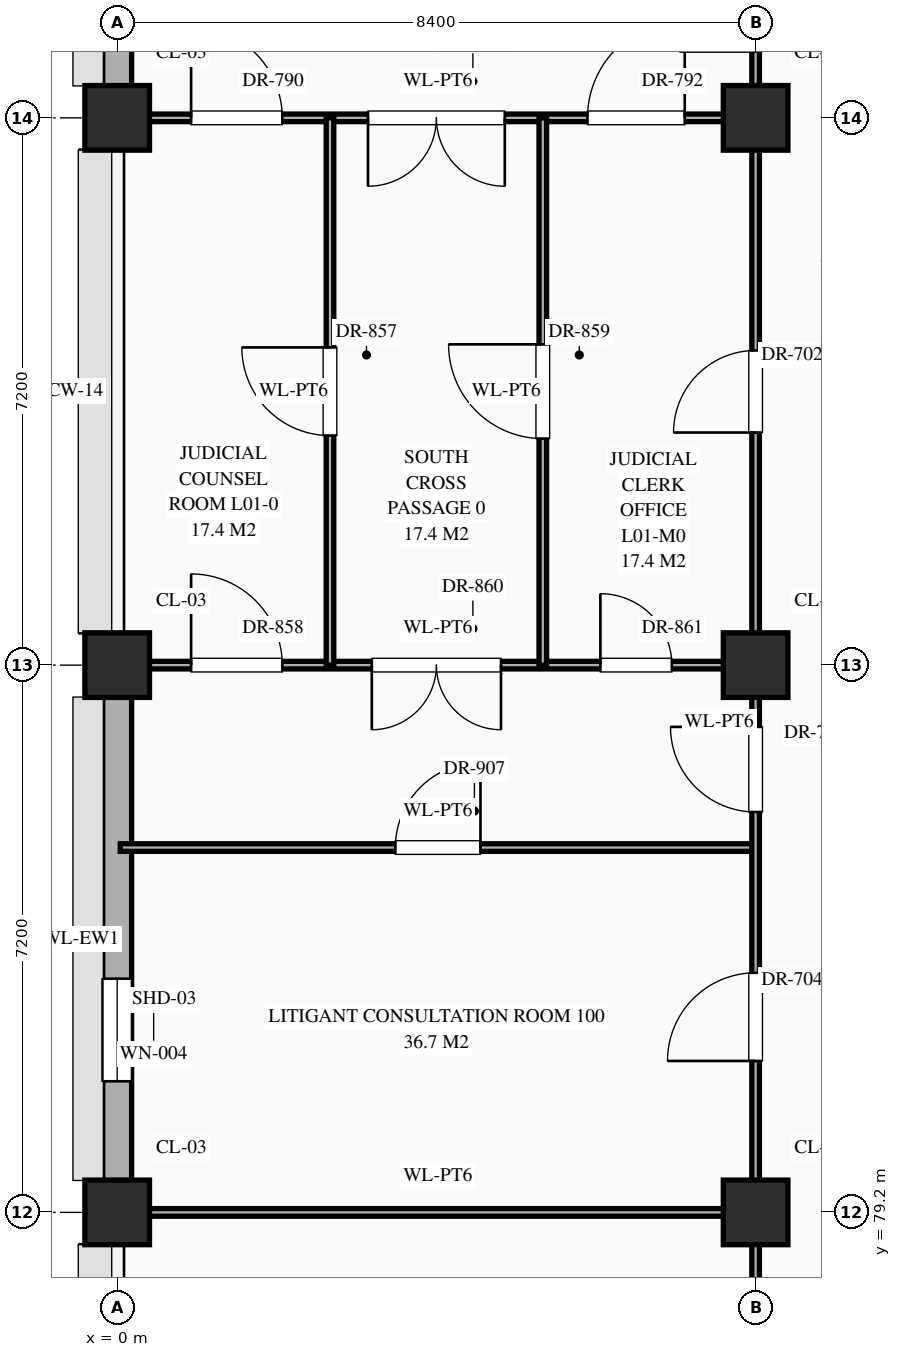
"""IFC4 building model, lengths in metres.
Left out: names, types, materials, properties, quantities, classifications, styles, units other than length and angle.
Written with IfcOpenShell. Run it as: python <this file> out.ifc"""

import sys

from ifc_helpers import new_model, si_unit, direction, frame, frame_2d, origin, origin_2d, place, context, subcontext, project, spatial, rectangle, extrude, element, fill, save


model = new_model("IFC4")
c1 = context("Model", 3, precision=1e-05, world=origin(), true_north=direction((0.0, 1.0)))
c2 = subcontext(c1, "Body", "Model", "MODEL_VIEW")
j1 = project(units=[si_unit("LENGTHUNIT", "METRE"), si_unit("PLANEANGLEUNIT", "RADIAN")], contexts=[c1])
p1 = place(None, origin())
s1 = spatial("IfcSite", under=j1, at=p1, CompositionType="ELEMENT")
p2 = place(p1, origin())
s2 = spatial("IfcBuilding", under=s1, at=p2, CompositionType="ELEMENT")
p3 = place(p2, origin())
s3 = spatial("IfcBuildingStorey", under=s2, at=p3, CompositionType="ELEMENT", Elevation=0.0)
for number, where, z_axis, x_axis in (
    (1, (0.0, 79.2, 0.0), (0.0, 0.0, 1.0), (1.0, 0.0, 0.0)),
    (2, (0.0, 86.4, 0.0), (0.0, 0.0, 1.0), (1.0, 0.0, 0.0)),
    (3, (0.0, 93.6, 0.0), (0.0, 0.0, 1.0), (1.0, 0.0, 0.0)),
    (4, (8.4, 79.2, 0.0), (0.0, 0.0, 1.0), (1.0, 0.0, 0.0)),
    (5, (8.4, 86.4, 0.0), (0.0, 0.0, 1.0), (1.0, 0.0, 0.0)),
    (6, (8.4, 93.6, 0.0), (0.0, 0.0, 1.0), (1.0, 0.0, 0.0)),
):
    element("IfcColumn", number, at=place(p3, frame(where, z_axis=z_axis, x_axis=x_axis)), inside=s3, PredefinedType="COLUMN", context=c2, shape_type="SweptSolid", body=[
        extrude(rectangle(XDim=0.85, YDim=0.85, at=origin_2d()), origin(), (0.0, 0.0, 1.0), 5.4),
    ])
p4 = place(p3, frame((0.0, 79.62, 0.0), z_axis=(0.0, 0.0, 1.0), x_axis=(0.0, 1.0, 0.0)))
e7 = element("IfcWall", 7, at=p4, inside=s3, PredefinedType="STANDARD", context=c2, shape_type="SweptSolid", body=[
    extrude(rectangle(XDim=6.36, YDim=0.38, at=frame_2d((3.18, 0.0))), origin(), (0.0, 0.0, 1.0), 4.47),
])
p5 = place(p4, frame((1.305, 0.0, 0.85)))
e8 = element("IfcOpeningElement", 8, at=p5, cuts=e7, PredefinedType="OPENING", context=c2, shape_type="SweptSolid", body=[
    extrude(rectangle(XDim=1.35, YDim=1.56, at=frame_2d((0.675, 0.78))), frame((0.0, 0.202, 0.0), z_axis=(0.0, -1.0, 0.0), x_axis=(1.0, 0.0, 0.0)), (0.0, 0.0, 1.0), 0.404),
])
p6 = place(p3, frame((0.0, 94.02, 0.0), z_axis=(0.0, 0.0, 1.0), x_axis=(0.0, 1.0, 0.0)))
e9 = element("IfcWall", 9, at=p6, inside=s3, PredefinedType="STANDARD", context=c2, shape_type="SweptSolid", body=[
    extrude(rectangle(XDim=6.36, YDim=0.38, at=frame_2d((3.18, 0.0))), origin(), (0.0, 0.0, 1.0), 4.47),
])
p7 = place(p6, frame((3.805, 0.0, 0.85)))
e10 = element("IfcOpeningElement", 10, at=p7, cuts=e9, PredefinedType="OPENING", context=c2, shape_type="SweptSolid", body=[
    extrude(rectangle(XDim=1.35, YDim=1.92, at=frame_2d((0.675, 0.96))), frame((0.0, 0.202, 0.0), z_axis=(0.0, -1.0, 0.0), x_axis=(1.0, 0.0, 0.0)), (0.0, 0.0, 1.0), 0.404),
])
p8 = place(p3, frame((0.04, 79.2, 0.0), z_axis=(0.0, 0.0, 1.0), x_axis=(1.0, 0.0, 0.0)))
e11 = element("IfcWall", 11, at=p8, inside=s3, PredefinedType="STANDARD", context=c2, shape_type="SweptSolid", body=[
    extrude(rectangle(XDim=8.36, YDim=0.1, at=frame_2d((4.18, 0.0))), origin(), (0.0, 0.0, 1.0), 4.27),
])
p9 = place(p3, frame((0.04, 84.0, 0.0), z_axis=(0.0, 0.0, 1.0), x_axis=(1.0, 0.0, 0.0)))
e12 = element("IfcWall", 12, at=p9, inside=s3, PredefinedType="STANDARD", context=c2, shape_type="SweptSolid", body=[
    extrude(rectangle(XDim=8.36, YDim=0.1, at=frame_2d((4.18, 0.0))), origin(), (0.0, 0.0, 1.0), 5.12),
])
p10 = place(p9, frame((3.62, 0.0, 0.0)))
e13 = element("IfcOpeningElement", 13, at=p10, cuts=e12, PredefinedType="OPENING", context=c2, shape_type="SweptSolid", body=[
    extrude(rectangle(XDim=1.12, YDim=2.25, at=frame_2d((0.56, 1.125))), frame((0.0, 0.062, 0.0), z_axis=(0.0, -1.0, 0.0), x_axis=(1.0, 0.0, 0.0)), (0.0, 0.0, 1.0), 0.124),
])
p11 = place(p3, frame((0.04, 86.4, 0.0), z_axis=(0.0, 0.0, 1.0), x_axis=(1.0, 0.0, 0.0)))
e14 = element("IfcWall", 14, at=p11, inside=s3, PredefinedType="STANDARD", context=c2, shape_type="SweptSolid", body=[
    extrude(rectangle(XDim=8.36, YDim=0.1, at=frame_2d((4.18, 0.0))), origin(), (0.0, 0.0, 1.0), 4.27),
])
p12 = place(p11, frame((0.933, 0.0, 0.0)))
e15 = element("IfcOpeningElement", 15, at=p12, cuts=e14, PredefinedType="OPENING", context=c2, shape_type="SweptSolid", body=[
    extrude(rectangle(XDim=1.2, YDim=2.35, at=frame_2d((0.6, 1.175))), frame((0.0, 0.062, 0.0), z_axis=(0.0, -1.0, 0.0), x_axis=(1.0, 0.0, 0.0)), (0.0, 0.0, 1.0), 0.124),
])
p13 = place(p11, frame((3.31, 0.0, 0.0)))
e16 = element("IfcOpeningElement", 16, at=p13, cuts=e14, PredefinedType="OPENING", context=c2, shape_type="SweptSolid", body=[
    extrude(rectangle(XDim=1.7, YDim=2.45, at=frame_2d((0.85, 1.225))), frame((0.0, 0.062, 0.0), z_axis=(0.0, -1.0, 0.0), x_axis=(1.0, 0.0, 0.0)), (0.0, 0.0, 1.0), 0.124),
])
p14 = place(p11, frame((6.317, 0.0, 0.0)))
e17 = element("IfcOpeningElement", 17, at=p14, cuts=e14, PredefinedType="OPENING", context=c2, shape_type="SweptSolid", body=[
    extrude(rectangle(XDim=0.94, YDim=2.3, at=frame_2d((0.47, 1.15))), frame((0.0, 0.062, 0.0), z_axis=(0.0, -1.0, 0.0), x_axis=(1.0, 0.0, 0.0)), (0.0, 0.0, 1.0), 0.124),
])
p15 = place(p3, frame((0.04, 93.6, 0.0), z_axis=(0.0, 0.0, 1.0), x_axis=(1.0, 0.0, 0.0)))
e18 = element("IfcWall", 18, at=p15, inside=s3, PredefinedType="STANDARD", context=c2, shape_type="SweptSolid", body=[
    extrude(rectangle(XDim=8.36, YDim=0.1, at=frame_2d((4.18, 0.0))), origin(), (0.0, 0.0, 1.0), 4.27),
])
p16 = place(p15, frame((0.933, 0.0, 0.0)))
e19 = element("IfcOpeningElement", 19, at=p16, cuts=e18, PredefinedType="OPENING", context=c2, shape_type="SweptSolid", body=[
    extrude(rectangle(XDim=1.2, YDim=2.35, at=frame_2d((0.6, 1.175))), frame((0.0, 0.062, 0.0), z_axis=(0.0, -1.0, 0.0), x_axis=(1.0, 0.0, 0.0)), (0.0, 0.0, 1.0), 0.124),
])
p17 = place(p15, frame((3.26, 0.0, 0.0)))
e20 = element("IfcOpeningElement", 20, at=p17, cuts=e18, PredefinedType="OPENING", context=c2, shape_type="SweptSolid", body=[
    extrude(rectangle(XDim=1.8, YDim=2.5, at=frame_2d((0.9, 1.25))), frame((0.0, 0.062, 0.0), z_axis=(0.0, -1.0, 0.0), x_axis=(1.0, 0.0, 0.0)), (0.0, 0.0, 1.0), 0.124),
])
p18 = place(p15, frame((6.147, 0.0, 0.0)))
e21 = element("IfcOpeningElement", 21, at=p18, cuts=e18, PredefinedType="OPENING", context=c2, shape_type="SweptSolid", body=[
    extrude(rectangle(XDim=1.28, YDim=2.35, at=frame_2d((0.64, 1.175))), frame((0.0, 0.062, 0.0), z_axis=(0.0, -1.0, 0.0), x_axis=(1.0, 0.0, 0.0)), (0.0, 0.0, 1.0), 0.124),
])
p19 = place(p3, frame((2.8, 86.4, 0.0), z_axis=(0.0, 0.0, 1.0), x_axis=(0.0, 1.0, 0.0)))
e22 = element("IfcWall", 22, at=p19, inside=s3, PredefinedType="STANDARD", context=c2, shape_type="SweptSolid", body=[
    extrude(rectangle(XDim=7.2, YDim=0.1, at=frame_2d((3.6, 0.0))), origin(), (0.0, 0.0, 1.0), 5.12),
])
p20 = place(p19, frame((3.02, 0.0, 0.0)))
e23 = element("IfcOpeningElement", 23, at=p20, cuts=e22, PredefinedType="OPENING", context=c2, shape_type="SweptSolid", body=[
    extrude(rectangle(XDim=1.16, YDim=2.3, at=frame_2d((0.58, 1.15))), frame((0.0, 0.062, 0.0), z_axis=(0.0, -1.0, 0.0), x_axis=(1.0, 0.0, 0.0)), (0.0, 0.0, 1.0), 0.124),
])
p21 = place(p3, frame((5.6, 86.4, 0.0), z_axis=(0.0, 0.0, 1.0), x_axis=(0.0, 1.0, 0.0)))
e24 = element("IfcWall", 24, at=p21, inside=s3, PredefinedType="STANDARD", context=c2, shape_type="SweptSolid", body=[
    extrude(rectangle(XDim=7.2, YDim=0.1, at=frame_2d((3.6, 0.0))), origin(), (0.0, 0.0, 1.0), 5.12),
])
p22 = place(p21, frame((2.98, 0.0, 0.0)))
e25 = element("IfcOpeningElement", 25, at=p22, cuts=e24, PredefinedType="OPENING", context=c2, shape_type="SweptSolid", body=[
    extrude(rectangle(XDim=1.24, YDim=2.3, at=frame_2d((0.62, 1.15))), frame((0.0, 0.062, 0.0), z_axis=(0.0, -1.0, 0.0), x_axis=(1.0, 0.0, 0.0)), (0.0, 0.0, 1.0), 0.124),
])
p23 = place(p3, frame((8.4, 43.2, 0.0), z_axis=(0.0, 0.0, 1.0), x_axis=(0.0, 1.0, 0.0)))
e26 = element("IfcWall", 26, at=p23, inside=s3, PredefinedType="STANDARD", context=c2, shape_type="SweptSolid", body=[
    extrude(rectangle(XDim=52.8, YDim=0.1, at=frame_2d((26.4, 0.0))), origin(), (0.0, 0.0, 1.0), 4.37),
])
p24 = place(p23, frame((51.272, 0.0, 0.0)))
e27 = element("IfcOpeningElement", 27, at=p24, cuts=e26, PredefinedType="OPENING", context=c2, shape_type="SweptSolid", body=[
    extrude(rectangle(XDim=1.0, YDim=2.25, at=frame_2d((0.5, 1.125))), frame((0.0, 0.062, 0.0), z_axis=(0.0, -1.0, 0.0), x_axis=(1.0, 0.0, 0.0)), (0.0, 0.0, 1.0), 0.124),
])
p25 = place(p23, frame((46.26, 0.0, 0.0)))
e28 = element("IfcOpeningElement", 28, at=p25, cuts=e26, PredefinedType="OPENING", context=c2, shape_type="SweptSolid", body=[
    extrude(rectangle(XDim=1.08, YDim=2.25, at=frame_2d((0.54, 1.125))), frame((0.0, 0.062, 0.0), z_axis=(0.0, -1.0, 0.0), x_axis=(1.0, 0.0, 0.0)), (0.0, 0.0, 1.0), 0.124),
])
p26 = place(p23, frame((41.268, 0.0, 0.0)))
e29 = element("IfcOpeningElement", 29, at=p26, cuts=e26, PredefinedType="OPENING", context=c2, shape_type="SweptSolid", body=[
    extrude(rectangle(XDim=1.12, YDim=2.25, at=frame_2d((0.56, 1.125))), frame((0.0, 0.062, 0.0), z_axis=(0.0, -1.0, 0.0), x_axis=(1.0, 0.0, 0.0)), (0.0, 0.0, 1.0), 0.124),
])
p27 = place(p23, frame((37.992, 0.0, 0.0)))
e30 = element("IfcOpeningElement", 30, at=p27, cuts=e26, PredefinedType="OPENING", context=c2, shape_type="SweptSolid", body=[
    extrude(rectangle(XDim=1.16, YDim=2.3, at=frame_2d((0.58, 1.15))), frame((0.0, 0.062, 0.0), z_axis=(0.0, -1.0, 0.0), x_axis=(1.0, 0.0, 0.0)), (0.0, 0.0, 1.0), 0.124),
])
p28 = place(p23, frame((17.38, 0.0, 0.0)))
e31 = element("IfcOpeningElement", 31, at=p28, cuts=e26, PredefinedType="OPENING", context=c2, shape_type="SweptSolid", body=[
    extrude(rectangle(XDim=1.24, YDim=2.3, at=frame_2d((0.62, 1.15))), frame((0.0, 0.062, 0.0), z_axis=(0.0, -1.0, 0.0), x_axis=(1.0, 0.0, 0.0)), (0.0, 0.0, 1.0), 0.124),
])
p29 = place(p23, frame((24.56, 0.0, 0.0)))
e32 = element("IfcOpeningElement", 32, at=p29, cuts=e26, PredefinedType="OPENING", context=c2, shape_type="SweptSolid", body=[
    extrude(rectangle(XDim=1.28, YDim=2.35, at=frame_2d((0.64, 1.175))), frame((0.0, 0.062, 0.0), z_axis=(0.0, -1.0, 0.0), x_axis=(1.0, 0.0, 0.0)), (0.0, 0.0, 1.0), 0.124),
])
p30 = place(p23, frame((31.93, 0.0, 0.0)))
e33 = element("IfcOpeningElement", 33, at=p30, cuts=e26, PredefinedType="OPENING", context=c2, shape_type="SweptSolid", body=[
    extrude(rectangle(XDim=0.94, YDim=2.3, at=frame_2d((0.47, 1.15))), frame((0.0, 0.062, 0.0), z_axis=(0.0, -1.0, 0.0), x_axis=(1.0, 0.0, 0.0)), (0.0, 0.0, 1.0), 0.124),
])
p31 = place(p23, frame((0.772, 0.0, 0.0)))
e34 = element("IfcOpeningElement", 34, at=p31, cuts=e26, PredefinedType="OPENING", context=c2, shape_type="SweptSolid", body=[
    extrude(rectangle(XDim=1.2, YDim=2.35, at=frame_2d((0.6, 1.175))), frame((0.0, 0.062, 0.0), z_axis=(0.0, -1.0, 0.0), x_axis=(1.0, 0.0, 0.0)), (0.0, 0.0, 1.0), 0.124),
])
p32 = place(p23, frame((4.008, 0.0, 0.0)))
e35 = element("IfcOpeningElement", 35, at=p32, cuts=e26, PredefinedType="OPENING", context=c2, shape_type="SweptSolid", body=[
    extrude(rectangle(XDim=1.24, YDim=2.3, at=frame_2d((0.62, 1.15))), frame((0.0, 0.062, 0.0), z_axis=(0.0, -1.0, 0.0), x_axis=(1.0, 0.0, 0.0)), (0.0, 0.0, 1.0), 0.124),
])
p33 = place(p23, frame((10.16, 0.0, 0.0)))
e36 = element("IfcOpeningElement", 36, at=p33, cuts=e26, PredefinedType="OPENING", context=c2, shape_type="SweptSolid", body=[
    extrude(rectangle(XDim=1.28, YDim=2.35, at=frame_2d((0.64, 1.175))), frame((0.0, 0.062, 0.0), z_axis=(0.0, -1.0, 0.0), x_axis=(1.0, 0.0, 0.0)), (0.0, 0.0, 1.0), 0.124),
])
p34 = place(p5, origin())
e37 = element("IfcWindow", 37, at=p34, inside=s3, PartitioningType="SINGLE_PANEL", PredefinedType="WINDOW", context=c2, shape_type="SweptSolid", body=[
    extrude(rectangle(XDim=1.35, YDim=1.56, at=frame_2d((0.675, 0.78))), frame((0.0, 0.03, 0.0), z_axis=(0.0, -1.0, 0.0), x_axis=(1.0, 0.0, 0.0)), (0.0, 0.0, 1.0), 0.06),
])
fill(e8, e37)
p35 = place(p25, origin())
e38 = element("IfcDoor", 38, at=p35, inside=s3, OperationType="SINGLE_SWING_LEFT", PredefinedType="DOOR", context=c2, shape_type="SweptSolid", body=[
    extrude(rectangle(XDim=1.08, YDim=2.25, at=frame_2d((0.54, 1.125))), frame((0.0, 0.025, 0.0), z_axis=(0.0, -1.0, 0.0), x_axis=(1.0, 0.0, 0.0)), (0.0, 0.0, 1.0), 0.05),
])
fill(e28, e38)
p36 = place(p26, origin())
e39 = element("IfcDoor", 39, at=p36, inside=s3, OperationType="SINGLE_SWING_RIGHT", PredefinedType="DOOR", context=c2, shape_type="SweptSolid", body=[
    extrude(rectangle(XDim=1.12, YDim=2.25, at=frame_2d((0.56, 1.125))), frame((0.0, 0.025, 0.0), z_axis=(0.0, -1.0, 0.0), x_axis=(1.0, 0.0, 0.0)), (0.0, 0.0, 1.0), 0.05),
])
fill(e29, e39)
p37 = place(p27, origin())
e40 = element("IfcDoor", 40, at=p37, inside=s3, OperationType="SINGLE_SWING_LEFT", PredefinedType="DOOR", context=c2, shape_type="SweptSolid", body=[
    extrude(rectangle(XDim=1.16, YDim=2.3, at=frame_2d((0.58, 1.15))), frame((0.0, 0.025, 0.0), z_axis=(0.0, -1.0, 0.0), x_axis=(1.0, 0.0, 0.0)), (0.0, 0.0, 1.0), 0.05),
])
fill(e30, e40)
p38 = place(p16, origin())
e41 = element("IfcDoor", 41, at=p38, inside=s3, OperationType="SINGLE_SWING_LEFT", PredefinedType="DOOR", context=c2, shape_type="SweptSolid", body=[
    extrude(rectangle(XDim=1.2, YDim=2.35, at=frame_2d((0.6, 1.175))), frame((0.0, 0.025, 0.0), z_axis=(0.0, -1.0, 0.0), x_axis=(1.0, 0.0, 0.0)), (0.0, 0.0, 1.0), 0.05),
])
fill(e19, e41)
p39 = place(p17, frame((1.8, 0.0, 0.0), z_axis=(0.0, 0.0, 1.0), x_axis=(-1.0, 0.0, 0.0)))
e42 = element("IfcDoor", 42, at=p39, inside=s3, OperationType="DOUBLE_DOOR_SINGLE_SWING", PredefinedType="DOOR", context=c2, shape_type="SweptSolid", body=[
    extrude(rectangle(XDim=1.8, YDim=2.5, at=frame_2d((0.9, 1.25))), frame((0.0, 0.025, 0.0), z_axis=(0.0, -1.0, 0.0), x_axis=(1.0, 0.0, 0.0)), (0.0, 0.0, 1.0), 0.05),
])
fill(e20, e42)
p40 = place(p18, origin())
e43 = element("IfcDoor", 43, at=p40, inside=s3, OperationType="SINGLE_SWING_RIGHT", PredefinedType="DOOR", context=c2, shape_type="SweptSolid", body=[
    extrude(rectangle(XDim=1.28, YDim=2.35, at=frame_2d((0.64, 1.175))), frame((0.0, 0.025, 0.0), z_axis=(0.0, -1.0, 0.0), x_axis=(1.0, 0.0, 0.0)), (0.0, 0.0, 1.0), 0.05),
])
fill(e21, e43)
p41 = place(p20, origin())
e44 = element("IfcDoor", 44, at=p41, inside=s3, OperationType="SINGLE_SWING_RIGHT", PredefinedType="DOOR", context=c2, shape_type="SweptSolid", body=[
    extrude(rectangle(XDim=1.16, YDim=2.3, at=frame_2d((0.58, 1.15))), frame((0.0, 0.025, 0.0), z_axis=(0.0, -1.0, 0.0), x_axis=(1.0, 0.0, 0.0)), (0.0, 0.0, 1.0), 0.05),
])
fill(e23, e44)
p42 = place(p12, origin())
e45 = element("IfcDoor", 45, at=p42, inside=s3, OperationType="SINGLE_SWING_LEFT", PredefinedType="DOOR", context=c2, shape_type="SweptSolid", body=[
    extrude(rectangle(XDim=1.2, YDim=2.35, at=frame_2d((0.6, 1.175))), frame((0.0, 0.025, 0.0), z_axis=(0.0, -1.0, 0.0), x_axis=(1.0, 0.0, 0.0)), (0.0, 0.0, 1.0), 0.05),
])
fill(e15, e45)
p43 = place(p22, origin())
e46 = element("IfcDoor", 46, at=p43, inside=s3, OperationType="SINGLE_SWING_RIGHT", PredefinedType="DOOR", context=c2, shape_type="SweptSolid", body=[
    extrude(rectangle(XDim=1.24, YDim=2.3, at=frame_2d((0.62, 1.15))), frame((0.0, 0.025, 0.0), z_axis=(0.0, -1.0, 0.0), x_axis=(1.0, 0.0, 0.0)), (0.0, 0.0, 1.0), 0.05),
])
fill(e25, e46)
p44 = place(p13, frame((1.7, 0.0, 0.0), z_axis=(0.0, 0.0, 1.0), x_axis=(-1.0, 0.0, 0.0)))
e47 = element("IfcDoor", 47, at=p44, inside=s3, OperationType="DOUBLE_DOOR_SINGLE_SWING", PredefinedType="DOOR", context=c2, shape_type="SweptSolid", body=[
    extrude(rectangle(XDim=1.7, YDim=2.45, at=frame_2d((0.85, 1.225))), frame((0.0, 0.025, 0.0), z_axis=(0.0, -1.0, 0.0), x_axis=(1.0, 0.0, 0.0)), (0.0, 0.0, 1.0), 0.05),
])
fill(e16, e47)
p45 = place(p14, origin())
e48 = element("IfcDoor", 48, at=p45, inside=s3, OperationType="SINGLE_SWING_LEFT", PredefinedType="DOOR", context=c2, shape_type="SweptSolid", body=[
    extrude(rectangle(XDim=0.94, YDim=2.3, at=frame_2d((0.47, 1.15))), frame((0.0, 0.025, 0.0), z_axis=(0.0, -1.0, 0.0), x_axis=(1.0, 0.0, 0.0)), (0.0, 0.0, 1.0), 0.05),
])
fill(e17, e48)
p46 = place(p10, origin())
e49 = element("IfcDoor", 49, at=p46, inside=s3, OperationType="SINGLE_SWING_RIGHT", PredefinedType="DOOR", context=c2, shape_type="SweptSolid", body=[
    extrude(rectangle(XDim=1.12, YDim=2.25, at=frame_2d((0.56, 1.125))), frame((0.0, 0.025, 0.0), z_axis=(0.0, -1.0, 0.0), x_axis=(1.0, 0.0, 0.0)), (0.0, 0.0, 1.0), 0.05),
])
fill(e13, e49)
save(model, sys.argv[1])
